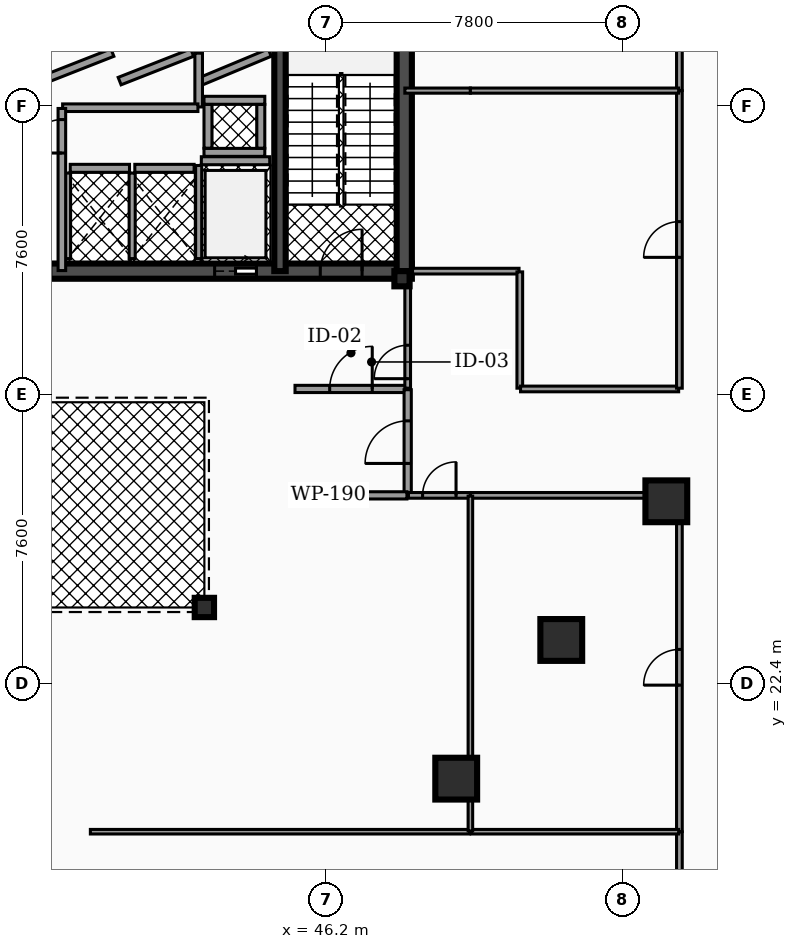
"""IFC4 building model, lengths in metres.
Left out: names, types, materials, properties, quantities, classifications, styles, units other than length and angle.
Written with IfcOpenShell. Run it as: python <this file> out.ifc"""

import sys

from ifc_helpers import new_model, si_unit, direction, frame, frame_2d, origin, origin_2d, place, context, subcontext, project, spatial, rectangle, hollow_rectangle, hollow_circle, extrude, element, fill, save


model = new_model("IFC4")
c1 = context("Model", 3, precision=1e-05, world=origin(), true_north=direction((0.0, 1.0)))
c2 = subcontext(c1, "Body", "Model", "MODEL_VIEW")
j1 = project(units=[si_unit("LENGTHUNIT", "METRE"), si_unit("PLANEANGLEUNIT", "RADIAN")], contexts=[c1])
p1 = place(None, origin())
s1 = spatial("IfcSite", under=j1, at=p1, CompositionType="ELEMENT")
p2 = place(p1, origin())
s2 = spatial("IfcBuilding", under=s1, at=p2, CompositionType="ELEMENT")
p3 = place(p2, frame((0.0, 0.0, 5.1)))
s3 = spatial("IfcBuildingStorey", under=s2, at=p3, CompositionType="ELEMENT", Elevation=5.1)
p4 = place(p3, frame((28.4, 33.25, 0.0), z_axis=(0.0, 0.0, 1.0), x_axis=(1.0, 0.0, 0.0)))
e1 = element("IfcWall", 1, at=p4, inside=s3, PredefinedType="SHEAR", context=c2, shape_type="SweptSolid", body=[
    extrude(rectangle(XDim=20.06, YDim=0.4, at=frame_2d((10.03, 0.0))), origin(), (0.0, 0.0, 1.0), 4.14),
])
p5 = place(p4, frame((4.03, 0.0, 0.0)))
e2 = element("IfcOpeningElement", 2, at=p5, cuts=e1, PredefinedType="OPENING", context=c2, shape_type="SweptSolid", body=[
    extrude(rectangle(XDim=1.1, YDim=2.15, at=frame_2d((0.55, 1.075))), frame((0.0, 0.21, 0.0), z_axis=(0.0, -1.0, 0.0), x_axis=(1.0, 0.0, 0.0)), (0.0, 0.0, 1.0), 0.42),
])
p6 = place(p4, frame((14.87, 0.0, 0.0)))
e3 = element("IfcOpeningElement", 3, at=p6, cuts=e1, PredefinedType="OPENING", context=c2, shape_type="SweptSolid", body=[
    extrude(rectangle(XDim=1.1, YDim=2.15, at=frame_2d((0.55, 1.075))), frame((0.0, 0.21, 0.0), z_axis=(0.0, -1.0, 0.0), x_axis=(1.0, 0.0, 0.0)), (0.0, 0.0, 1.0), 0.42),
])
p7 = place(p4, frame((1.31, 0.0, 0.0)))
e4 = element("IfcOpeningElement", 4, at=p7, cuts=e1, PredefinedType="OPENING", context=c2, shape_type="SweptSolid", body=[
    extrude(rectangle(XDim=1.1, YDim=2.2, at=frame_2d((0.55, 1.1))), frame((0.0, 0.21, 0.0), z_axis=(0.0, -1.0, 0.0), x_axis=(1.0, 0.0, 0.0)), (0.0, 0.0, 1.0), 0.42),
])
p8 = place(p4, frame((9.44, 0.0, 0.0)))
e5 = element("IfcOpeningElement", 5, at=p8, cuts=e1, PredefinedType="OPENING", context=c2, shape_type="SweptSolid", body=[
    extrude(rectangle(XDim=1.12, YDim=2.05, at=frame_2d((0.56, 1.025))), frame((0.0, 0.21, 0.0), z_axis=(0.0, -1.0, 0.0), x_axis=(1.0, 0.0, 0.0)), (0.0, 0.0, 1.0), 0.42),
])
p9 = place(p4, frame((17.65, 0.0, 0.0)))
e6 = element("IfcOpeningElement", 6, at=p9, cuts=e1, PredefinedType="OPENING", context=c2, shape_type="SweptSolid", body=[
    extrude(rectangle(XDim=1.1, YDim=2.2, at=frame_2d((0.55, 1.1))), frame((0.0, 0.21, 0.0), z_axis=(0.0, -1.0, 0.0), x_axis=(1.0, 0.0, 0.0)), (0.0, 0.0, 1.0), 0.42),
])
p10 = place(p3, frame((44.99, 33.25, 0.0), z_axis=(0.0, 0.0, 1.0), x_axis=(0.0, 1.0, 0.0)))
e7 = element("IfcWall", 7, at=p10, inside=s3, PredefinedType="SHEAR", context=c2, shape_type="SweptSolid", body=[
    extrude(rectangle(XDim=10.2, YDim=0.3, at=frame_2d((5.1, 0.0))), origin(), (0.0, 0.0, 1.0), 4.14),
])
p11 = place(p3, frame((48.26, 33.25, 0.0), z_axis=(0.0, 0.0, 1.0), x_axis=(0.0, 1.0, 0.0)))
e8 = element("IfcWall", 8, at=p11, inside=s3, PredefinedType="SHEAR", context=c2, shape_type="SweptSolid", body=[
    extrude(rectangle(XDim=10.2, YDim=0.4, at=frame_2d((5.1, 0.0))), origin(), (0.0, 0.0, 1.0), 4.14),
])
for number, where, z_axis, x_axis in (
    (9, (49.627, 19.896, 0.0), (0.0, 0.0, 1.0), (1.0, 0.0, 0.0)),
    (10, (52.391, 23.545, 0.0), (0.0, 0.0, 1.0), (1.0, 0.0, 0.0)),
    (11, (55.156, 27.194, 0.0), (0.0, 0.0, 1.0), (1.0, 0.0, 0.0)),
):
    element("IfcColumn", number, at=place(p3, frame(where, z_axis=z_axis, x_axis=x_axis)), inside=s3, PredefinedType="COLUMN", context=c2, shape_type="SweptSolid", body=[
        extrude(hollow_rectangle(XDim=1.1, YDim=1.1, WallThickness=0.055, at=origin_2d()), origin(), (0.0, 0.0, 1.0), 4.14),
    ])
p12 = place(p3, frame((48.2, 33.05, 0.0), z_axis=(0.0, 0.0, 1.0), x_axis=(1.0, 0.0, 0.0)))
e12 = element("IfcColumn", 12, at=p12, inside=s3, PredefinedType="PILASTER", context=c2, shape_type="SweptSolid", body=[
    extrude(hollow_rectangle(XDim=0.4, YDim=0.4, WallThickness=0.02, at=origin_2d()), origin(), (0.0, 0.0, 1.0), 4.14),
])
p13 = place(p3, frame((43.0, 24.4, 0.0), z_axis=(0.0, 0.0, 1.0), x_axis=(1.0, 0.0, 0.0)))
e13 = element("IfcColumn", 13, at=p13, inside=s3, PredefinedType="COLUMN", context=c2, shape_type="SweptSolid", body=[
    extrude(hollow_circle(Radius=0.254, WallThickness=0.02, at=origin_2d()), origin(), (0.0, 0.0, 1.0), 4.14),
])
p14 = place(p3, frame((42.92, 36.155, 0.0), z_axis=(0.0, 0.0, 1.0), x_axis=(1.0, 0.0, 0.0)))
e14 = element("IfcWall", 14, at=p14, inside=s3, PredefinedType="SOLIDWALL", context=c2, shape_type="SweptSolid", body=[
    extrude(rectangle(XDim=1.8, YDim=0.21, at=frame_2d((0.9, 0.0))), origin(), (0.0, 0.0, 1.0), 3.112),
])
p15 = place(p3, frame((42.85, 33.58, 0.0), z_axis=(0.0, 0.0, 1.0), x_axis=(0.0, 1.0, 0.0)))
e15 = element("IfcWall", 15, at=p15, inside=s3, PredefinedType="SOLIDWALL", context=c2, shape_type="SweptSolid", body=[
    extrude(rectangle(XDim=2.45, YDim=0.16, at=frame_2d((1.225, 0.0))), origin(), (0.0, 0.0, 1.0), 3.112),
])
p16 = place(p3, frame((42.92, 38.25, 0.0), z_axis=(0.0, 0.0, 1.0), x_axis=(0.9230806271, 0.384606494839, 0.0)))
e16 = element("IfcWall", 16, at=p16, inside=s3, PredefinedType="SOLIDWALL", context=c2, shape_type="SweptSolid", body=[
    extrude(rectangle(XDim=1.95, YDim=0.21, at=frame_2d((0.975, 0.0))), origin(), (0.0, 0.0, 1.0), 3.112),
])
for number, where, z_axis, x_axis in (
    (17, (38.67, 38.25, 0.0), (0.0, 0.0, 1.0), (0.931, 0.365, 0.0)),
    (18, (40.77, 38.25, 0.0), (0.0, 0.0, 1.0), (0.931, 0.366, 0.0)),
):
    element("IfcWall", number, at=place(p3, frame(where, z_axis=z_axis, x_axis=x_axis)), inside=s3, PredefinedType="SOLIDWALL", context=c2, shape_type="SweptSolid", body=[
        extrude(rectangle(XDim=2.052, YDim=0.21, at=frame_2d((1.026, 0.0))), origin(), (0.0, 0.0, 1.0), 3.112),
    ])
p17 = place(p3, frame((39.47, 35.955, 0.0), z_axis=(0.0, 0.0, 1.0), x_axis=(1.0, 0.0, 0.0)))
e19 = element("IfcWall", 19, at=p17, inside=s3, PredefinedType="SOLIDWALL", context=c2, shape_type="SweptSolid", body=[
    extrude(rectangle(XDim=1.56, YDim=0.21, at=frame_2d((0.78, 0.0))), origin(), (0.0, 0.0, 1.0), 3.112),
])
for number, where, z_axis, x_axis in (
    (20, (39.4, 33.58, 0.0), (0.0, 0.0, 1.0), (0.0, 1.0, 0.0)),
    (21, (41.1, 33.58, 0.0), (0.0, 0.0, 1.0), (0.0, 1.0, 0.0)),
):
    element("IfcWall", number, at=place(p3, frame(where, z_axis=z_axis, x_axis=x_axis)), inside=s3, PredefinedType="SOLIDWALL", context=c2, shape_type="SweptSolid", body=[
        extrude(rectangle(XDim=2.25, YDim=0.16, at=frame_2d((1.125, 0.0))), origin(), (0.0, 0.0, 1.0), 3.112),
    ])
p18 = place(p3, frame((41.17, 35.955, 0.0), z_axis=(0.0, 0.0, 1.0), x_axis=(1.0, 0.0, 0.0)))
e22 = element("IfcWall", 22, at=p18, inside=s3, PredefinedType="SOLIDWALL", context=c2, shape_type="SweptSolid", body=[
    extrude(rectangle(XDim=1.56, YDim=0.21, at=frame_2d((0.78, 0.0))), origin(), (0.0, 0.0, 1.0), 3.112),
])
for number, where, z_axis, x_axis in (
    (23, (42.99, 36.375, 0.0), (0.0, 0.0, 1.0), (1.0, 0.0, 0.0)),
    (24, (42.99, 37.745, 0.0), (0.0, 0.0, 1.0), (1.0, 0.0, 0.0)),
):
    element("IfcWall", number, at=place(p3, frame(where, z_axis=z_axis, x_axis=x_axis)), inside=s3, PredefinedType="SOLIDWALL", context=c2, shape_type="SweptSolid", body=[
        extrude(rectangle(XDim=1.6, YDim=0.21, at=frame_2d((0.8, 0.0))), origin(), (0.0, 0.0, 1.0), 4.14),
    ])
for number, where, z_axis, x_axis in (
    (25, (43.095, 36.485, 0.0), (0.0, 0.0, 1.0), (0.0, 1.0, 0.0)),
    (26, (44.485, 36.485, 0.0), (0.0, 0.0, 1.0), (0.0, 1.0, 0.0)),
):
    element("IfcWall", number, at=place(p3, frame(where, z_axis=z_axis, x_axis=x_axis)), inside=s3, PredefinedType="SOLIDWALL", context=c2, shape_type="SweptSolid", body=[
        extrude(rectangle(XDim=1.15, YDim=0.21, at=frame_2d((0.575, 0.0))), origin(), (0.0, 0.0, 1.0), 4.14),
    ])
p19 = place(p3, frame((42.85, 37.57, 0.0), z_axis=(0.0, 0.0, 1.0), x_axis=(0.0, 1.0, 0.0)))
e27 = element("IfcWall", 27, at=p19, inside=s3, PredefinedType="PARTITIONING", context=c2, shape_type="SweptSolid", body=[
    extrude(rectangle(XDim=1.415, YDim=0.2, at=frame_2d((0.708, 0.0))), origin(), (0.0, 0.0, 1.0), 3.097),
])
p20 = place(p3, frame((39.27, 37.55, 0.0), z_axis=(0.0, 0.0, 1.0), x_axis=(1.0, 0.0, 0.0)))
e28 = element("IfcWall", 28, at=p20, inside=s3, PredefinedType="PARTITIONING", context=c2, shape_type="SweptSolid", body=[
    extrude(rectangle(XDim=3.56, YDim=0.2, at=frame_2d((1.78, 0.0))), origin(), (0.0, 0.0, 1.0), 3.097),
])
p21 = place(p3, frame((39.25, 33.265, 0.0), z_axis=(0.0, 0.0, 1.0), x_axis=(0.0, 1.0, 0.0)))
e29 = element("IfcWall", 29, at=p21, inside=s3, PredefinedType="PARTITIONING", context=c2, shape_type="SweptSolid", body=[
    extrude(rectangle(XDim=4.265, YDim=0.2, at=frame_2d((2.133, 0.0))), origin(), (0.0, 0.0, 1.0), 3.097),
])
p22 = place(p21, frame((3.093, 0.0, 0.0)))
e30 = element("IfcOpeningElement", 30, at=p22, cuts=e29, PredefinedType="OPENING", context=c2, shape_type="SweptSolid", body=[
    extrude(rectangle(XDim=0.88, YDim=2.05, at=frame_2d((0.44, 1.025))), frame((0.0, 0.11, 0.0), z_axis=(0.0, -1.0, 0.0), x_axis=(1.0, 0.0, 0.0)), (0.0, 0.0, 1.0), 0.22),
])
p23 = place(p3, frame((45.385, 30.15, 0.0), z_axis=(0.0, 0.0, 1.0), x_axis=(1.0, 0.0, 0.0)))
e31 = element("IfcWall", 31, at=p23, inside=s3, PredefinedType="PARTITIONING", context=c2, shape_type="SweptSolid", body=[
    extrude(rectangle(XDim=2.945, YDim=0.19, at=frame_2d((1.473, 0.0))), origin(), (0.0, 0.0, 1.0), 3.097),
])
p24 = place(p23, frame((0.913, 0.0, 0.0)))
e32 = element("IfcOpeningElement", 32, at=p24, cuts=e31, PredefinedType="OPENING", context=c2, shape_type="SweptSolid", body=[
    extrude(rectangle(XDim=1.12, YDim=2.05, at=frame_2d((0.56, 1.025))), frame((0.0, 0.105, 0.0), z_axis=(0.0, -1.0, 0.0), x_axis=(1.0, 0.0, 0.0)), (0.0, 0.0, 1.0), 0.21),
])
p25 = place(p3, frame((48.35, 30.17, 0.0), z_axis=(0.0, 0.0, 1.0), x_axis=(0.0, 1.0, 0.0)))
e33 = element("IfcWall", 33, at=p25, inside=s3, PredefinedType="PARTITIONING", context=c2, shape_type="SweptSolid", body=[
    extrude(rectangle(XDim=2.975, YDim=0.15, at=frame_2d((1.488, 0.0))), origin(), (0.0, 0.0, 1.0), 3.097),
])
p26 = place(p25, frame((0.25, 0.0, 0.0)))
e34 = element("IfcOpeningElement", 34, at=p26, cuts=e33, PredefinedType="OPENING", context=c2, shape_type="SweptSolid", body=[
    extrude(rectangle(XDim=0.88, YDim=2.05, at=frame_2d((0.44, 1.025))), frame((0.0, 0.085, 0.0), z_axis=(0.0, -1.0, 0.0), x_axis=(1.0, 0.0, 0.0)), (0.0, 0.0, 1.0), 0.17),
])
p27 = place(p3, frame((48.35, 27.37, 0.0), z_axis=(0.0, 0.0, 1.0), x_axis=(0.0, 1.0, 0.0)))
e35 = element("IfcWall", 35, at=p27, inside=s3, PredefinedType="PARTITIONING", context=c2, shape_type="SweptSolid", body=[
    extrude(rectangle(XDim=2.76, YDim=0.19, at=frame_2d((1.38, 0.0))), origin(), (0.0, 0.0, 1.0), 3.097),
])
p28 = place(p27, frame((0.82, 0.0, 0.0)))
e36 = element("IfcOpeningElement", 36, at=p28, cuts=e35, PredefinedType="OPENING", context=c2, shape_type="SweptSolid", body=[
    extrude(rectangle(XDim=1.12, YDim=2.05, at=frame_2d((0.56, 1.025))), frame((0.0, 0.105, 0.0), z_axis=(0.0, -1.0, 0.0), x_axis=(1.0, 0.0, 0.0)), (0.0, 0.0, 1.0), 0.21),
])
p29 = place(p3, frame((45.4, 27.35, 0.0), z_axis=(0.0, 0.0, 1.0), x_axis=(1.0, 0.0, 0.0)))
e37 = element("IfcWall", 37, at=p29, inside=s3, PredefinedType="PARTITIONING", context=c2, shape_type="SweptSolid", body=[
    extrude(rectangle(XDim=2.93, YDim=0.19, at=frame_2d((1.465, 0.0))), origin(), (0.0, 0.0, 1.0), 3.097),
])
p30 = place(p3, frame((55.5, 12.02, 0.0), z_axis=(0.0, 0.0, 1.0), x_axis=(0.0, 1.0, 0.0)))
e38 = element("IfcWall", 38, at=p30, inside=s3, PredefinedType="PARTITIONING", context=c2, shape_type="SweptSolid", body=[
    extrude(rectangle(XDim=6.475, YDim=0.15, at=frame_2d((3.238, 0.0))), origin(), (0.0, 0.0, 1.0), 3.097),
])
p31 = place(p3, frame((48.37, 27.35, 0.0), z_axis=(0.0, 0.0, 1.0), x_axis=(1.0, 0.0, 0.0)))
e39 = element("IfcWall", 39, at=p31, inside=s3, PredefinedType="PARTITIONING", context=c2, shape_type="SweptSolid", body=[
    extrude(rectangle(XDim=1.625, YDim=0.15, at=frame_2d((0.812, 0.0))), origin(), (0.0, 0.0, 1.0), 3.097),
])
p32 = place(p31, frame((0.373, 0.0, 0.0)))
e40 = element("IfcOpeningElement", 40, at=p32, cuts=e39, PredefinedType="OPENING", context=c2, shape_type="SweptSolid", body=[
    extrude(rectangle(XDim=0.88, YDim=2.05, at=frame_2d((0.44, 1.025))), frame((0.0, 0.085, 0.0), z_axis=(0.0, -1.0, 0.0), x_axis=(1.0, 0.0, 0.0)), (0.0, 0.0, 1.0), 0.17),
])
p33 = place(p3, frame((55.5, 18.505, 0.0), z_axis=(0.0, 0.0, 1.0), x_axis=(0.0, 1.0, 0.0)))
e41 = element("IfcWall", 41, at=p33, inside=s3, PredefinedType="PARTITIONING", context=c2, shape_type="SweptSolid", body=[
    extrude(rectangle(XDim=8.643, YDim=0.15, at=frame_2d((4.322, 0.0))), origin(), (0.0, 0.0, 1.0), 3.097),
])
p34 = place(p33, frame((3.852, 0.0, 0.0)))
e42 = element("IfcOpeningElement", 42, at=p34, cuts=e41, PredefinedType="OPENING", context=c2, shape_type="SweptSolid", body=[
    extrude(rectangle(XDim=0.94, YDim=2.05, at=frame_2d((0.47, 1.025))), frame((0.0, 0.085, 0.0), z_axis=(0.0, -1.0, 0.0), x_axis=(1.0, 0.0, 0.0)), (0.0, 0.0, 1.0), 0.17),
])
p35 = place(p3, frame((50.005, 27.35, 0.0), z_axis=(0.0, 0.0, 1.0), x_axis=(1.0, 0.0, 0.0)))
e43 = element("IfcWall", 43, at=p35, inside=s3, PredefinedType="PARTITIONING", context=c2, shape_type="SweptSolid", body=[
    extrude(rectangle(XDim=5.293, YDim=0.15, at=frame_2d((2.646, 0.0))), origin(), (0.0, 0.0, 1.0), 3.097),
])
p36 = place(p3, frame((48.478, 33.25, 0.0), z_axis=(0.0, 0.0, 1.0), x_axis=(1.0, 0.0, 0.0)))
e44 = element("IfcWall", 44, at=p36, inside=s3, PredefinedType="PARTITIONING", context=c2, shape_type="SweptSolid", body=[
    extrude(rectangle(XDim=2.802, YDim=0.15, at=frame_2d((1.401, 0.0))), origin(), (0.0, 0.0, 1.0), 3.097),
])
p37 = place(p3, frame((51.3, 30.17, 0.0), z_axis=(0.0, 0.0, 1.0), x_axis=(0.0, 1.0, 0.0)))
e45 = element("IfcWall", 45, at=p37, inside=s3, PredefinedType="PARTITIONING", context=c2, shape_type="SweptSolid", body=[
    extrude(rectangle(XDim=3.06, YDim=0.15, at=frame_2d((1.53, 0.0))), origin(), (0.0, 0.0, 1.0), 3.097),
])
p38 = place(p3, frame((51.32, 30.15, 0.0), z_axis=(0.0, 0.0, 1.0), x_axis=(1.0, 0.0, 0.0)))
e46 = element("IfcWall", 46, at=p38, inside=s3, PredefinedType="PARTITIONING", context=c2, shape_type="SweptSolid", body=[
    extrude(rectangle(XDim=4.16, YDim=0.15, at=frame_2d((2.08, 0.0))), origin(), (0.0, 0.0, 1.0), 3.097),
])
p39 = place(p3, frame((55.5, 30.17, 0.0), z_axis=(0.0, 0.0, 1.0), x_axis=(0.0, 1.0, 0.0)))
e47 = element("IfcWall", 47, at=p39, inside=s3, PredefinedType="PARTITIONING", context=c2, shape_type="SweptSolid", body=[
    extrude(rectangle(XDim=7.825, YDim=0.15, at=frame_2d((3.913, 0.0))), origin(), (0.0, 0.0, 1.0), 3.097),
])
p40 = place(p39, frame((3.442, 0.0, 0.0)))
e48 = element("IfcOpeningElement", 48, at=p40, cuts=e47, PredefinedType="OPENING", context=c2, shape_type="SweptSolid", body=[
    extrude(rectangle(XDim=0.94, YDim=2.05, at=frame_2d((0.47, 1.025))), frame((0.0, 0.085, 0.0), z_axis=(0.0, -1.0, 0.0), x_axis=(1.0, 0.0, 0.0)), (0.0, 0.0, 1.0), 0.17),
])
p41 = place(p3, frame((55.5, 38.005, 0.0), z_axis=(0.0, 0.0, 1.0), x_axis=(0.0, 1.0, 0.0)))
e49 = element("IfcWall", 49, at=p41, inside=s3, PredefinedType="PARTITIONING", context=c2, shape_type="SweptSolid", body=[
    extrude(rectangle(XDim=6.975, YDim=0.15, at=frame_2d((3.488, 0.0))), origin(), (0.0, 0.0, 1.0), 3.097),
])
p42 = place(p41, frame((3.018, 0.0, 0.0)))
e50 = element("IfcOpeningElement", 50, at=p42, cuts=e49, PredefinedType="OPENING", context=c2, shape_type="SweptSolid", body=[
    extrude(rectangle(XDim=0.94, YDim=2.05, at=frame_2d((0.47, 1.025))), frame((0.0, 0.085, 0.0), z_axis=(0.0, -1.0, 0.0), x_axis=(1.0, 0.0, 0.0)), (0.0, 0.0, 1.0), 0.17),
])
p43 = place(p3, frame((40.0, 18.5, 0.0), z_axis=(0.0, 0.0, 1.0), x_axis=(1.0, 0.0, 0.0)))
e51 = element("IfcWall", 51, at=p43, inside=s3, PredefinedType="PARTITIONING", context=c2, shape_type="SweptSolid", body=[
    extrude(rectangle(XDim=9.98, YDim=0.12, at=frame_2d((4.99, 0.0))), origin(), (0.0, 0.0, 1.0), 3.097),
])
p44 = place(p3, frame((50.02, 18.5, 0.0), z_axis=(0.0, 0.0, 1.0), x_axis=(1.0, 0.0, 0.0)))
e52 = element("IfcWall", 52, at=p44, inside=s3, PredefinedType="PARTITIONING", context=c2, shape_type="SweptSolid", body=[
    extrude(rectangle(XDim=5.46, YDim=0.12, at=frame_2d((2.73, 0.0))), origin(), (0.0, 0.0, 1.0), 3.097),
])
p45 = place(p3, frame((50.0, 18.52, 0.0), z_axis=(0.0, 0.0, 1.0), x_axis=(0.0, 1.0, 0.0)))
e53 = element("IfcWall", 53, at=p45, inside=s3, PredefinedType="PARTITIONING", context=c2, shape_type="SweptSolid", body=[
    extrude(rectangle(XDim=8.81, YDim=0.12, at=frame_2d((4.405, 0.0))), origin(), (0.0, 0.0, 1.0), 3.097),
])
p46 = place(p3, frame((48.275, 38.0, 0.0), z_axis=(0.0, 0.0, 1.0), x_axis=(1.0, 0.0, 0.0)))
e54 = element("IfcWall", 54, at=p46, inside=s3, PredefinedType="PARTITIONING", context=c2, shape_type="SweptSolid", body=[
    extrude(rectangle(XDim=1.725, YDim=0.135, at=frame_2d((0.863, 0.0))), origin(), (0.0, 0.0, 1.0), 3.097),
])
p47 = place(p3, frame((50.0, 38.0, 0.0), z_axis=(0.0, 0.0, 1.0), x_axis=(1.0, 0.0, 0.0)))
e55 = element("IfcWall", 55, at=p47, inside=s3, PredefinedType="PARTITIONING", context=c2, shape_type="SweptSolid", body=[
    extrude(rectangle(XDim=5.48, YDim=0.135, at=frame_2d((2.74, 0.0))), origin(), (0.0, 0.0, 1.0), 3.097),
])
p48 = place(p6, origin())
e56 = element("IfcDoor", 56, at=p48, inside=s3, OperationType="SLIDING_TO_RIGHT", PredefinedType="DOOR", context=c2, shape_type="SweptSolid", body=[
    extrude(rectangle(XDim=1.1, YDim=2.15, at=frame_2d((0.55, 1.075))), frame((0.0, 0.025, 0.0), z_axis=(0.0, -1.0, 0.0), x_axis=(1.0, 0.0, 0.0)), (0.0, 0.0, 1.0), 0.05),
])
fill(e3, e56)
p49 = place(p9, origin())
e57 = element("IfcDoor", 57, at=p49, inside=s3, OperationType="SINGLE_SWING_RIGHT", PredefinedType="DOOR", context=c2, shape_type="SweptSolid", body=[
    extrude(rectangle(XDim=1.1, YDim=2.2, at=frame_2d((0.55, 1.1))), frame((0.0, 0.025, 0.0), z_axis=(0.0, -1.0, 0.0), x_axis=(1.0, 0.0, 0.0)), (0.0, 0.0, 1.0), 0.05),
])
fill(e6, e57)
p50 = place(p22, origin())
e58 = element("IfcDoor", 58, at=p50, inside=s3, OperationType="SINGLE_SWING_LEFT", PredefinedType="DOOR", context=c2, shape_type="SweptSolid", body=[
    extrude(rectangle(XDim=0.88, YDim=2.05, at=frame_2d((0.44, 1.025))), frame((0.0, 0.025, 0.0), z_axis=(0.0, -1.0, 0.0), x_axis=(1.0, 0.0, 0.0)), (0.0, 0.0, 1.0), 0.05),
])
fill(e30, e58)
p51 = place(p24, origin())
e59 = element("IfcDoor", 59, at=p51, inside=s3, OperationType="SINGLE_SWING_RIGHT", PredefinedType="DOOR", context=c2, shape_type="SweptSolid", body=[
    extrude(rectangle(XDim=1.12, YDim=2.05, at=frame_2d((0.56, 1.025))), frame((0.0, 0.025, 0.0), z_axis=(0.0, -1.0, 0.0), x_axis=(1.0, 0.0, 0.0)), (0.0, 0.0, 1.0), 0.05),
])
fill(e32, e59)
p52 = place(p26, origin())
e60 = element("IfcDoor", 60, at=p52, inside=s3, OperationType="SINGLE_SWING_LEFT", PredefinedType="DOOR", context=c2, shape_type="SweptSolid", body=[
    extrude(rectangle(XDim=0.88, YDim=2.05, at=frame_2d((0.44, 1.025))), frame((0.0, 0.025, 0.0), z_axis=(0.0, -1.0, 0.0), x_axis=(1.0, 0.0, 0.0)), (0.0, 0.0, 1.0), 0.05),
])
fill(e34, e60)
p53 = place(p28, origin())
e61 = element("IfcDoor", 61, at=p53, inside=s3, OperationType="SINGLE_SWING_LEFT", PredefinedType="DOOR", context=c2, shape_type="SweptSolid", body=[
    extrude(rectangle(XDim=1.12, YDim=2.05, at=frame_2d((0.56, 1.025))), frame((0.0, 0.025, 0.0), z_axis=(0.0, -1.0, 0.0), x_axis=(1.0, 0.0, 0.0)), (0.0, 0.0, 1.0), 0.05),
])
fill(e36, e61)
p54 = place(p32, origin())
e62 = element("IfcDoor", 62, at=p54, inside=s3, OperationType="SINGLE_SWING_RIGHT", PredefinedType="DOOR", context=c2, shape_type="SweptSolid", body=[
    extrude(rectangle(XDim=0.88, YDim=2.05, at=frame_2d((0.44, 1.025))), frame((0.0, 0.025, 0.0), z_axis=(0.0, -1.0, 0.0), x_axis=(1.0, 0.0, 0.0)), (0.0, 0.0, 1.0), 0.05),
])
fill(e40, e62)
p55 = place(p34, origin())
e63 = element("IfcDoor", 63, at=p55, inside=s3, OperationType="SINGLE_SWING_LEFT", PredefinedType="DOOR", context=c2, shape_type="SweptSolid", body=[
    extrude(rectangle(XDim=0.94, YDim=2.05, at=frame_2d((0.47, 1.025))), frame((0.0, 0.025, 0.0), z_axis=(0.0, -1.0, 0.0), x_axis=(1.0, 0.0, 0.0)), (0.0, 0.0, 1.0), 0.05),
])
fill(e42, e63)
p56 = place(p40, origin())
e64 = element("IfcDoor", 64, at=p56, inside=s3, OperationType="SINGLE_SWING_LEFT", PredefinedType="DOOR", context=c2, shape_type="SweptSolid", body=[
    extrude(rectangle(XDim=0.94, YDim=2.05, at=frame_2d((0.47, 1.025))), frame((0.0, 0.025, 0.0), z_axis=(0.0, -1.0, 0.0), x_axis=(1.0, 0.0, 0.0)), (0.0, 0.0, 1.0), 0.05),
])
fill(e48, e64)
save(model, sys.argv[1])
